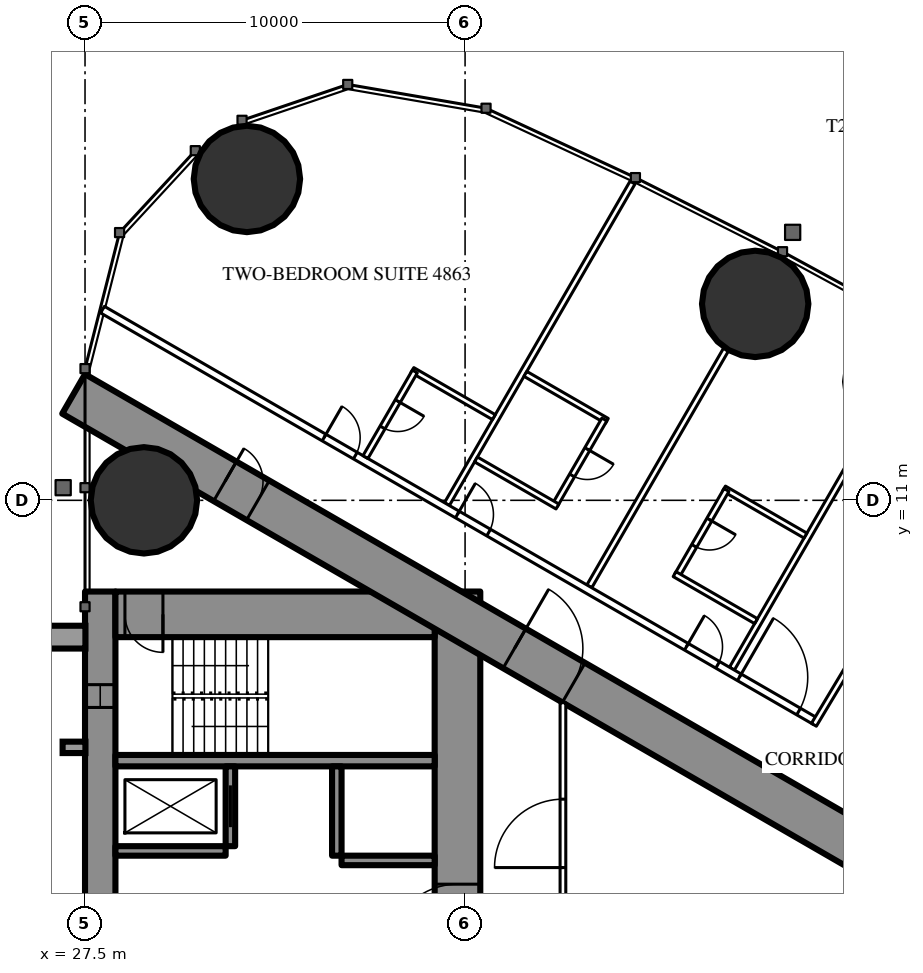
"""IFC4 building model, lengths in metres.
Left out: names, types, materials, properties, quantities, classifications, styles, units other than length and angle.
Written with IfcOpenShell. Run it as: python <this file> out.ifc"""

import sys

from ifc_helpers import new_model, si_unit, direction, frame, frame_2d, origin, origin_2d, place, context, subcontext, project, spatial, rectangle, circle, extrude, element, fill, save


model = new_model("IFC4")
c1 = context("Model", 3, precision=1e-05, world=origin(), true_north=direction((0.0, 1.0)))
c2 = subcontext(c1, "Body", "Model", "MODEL_VIEW")
j1 = project(units=[si_unit("LENGTHUNIT", "METRE"), si_unit("PLANEANGLEUNIT", "RADIAN")], contexts=[c1])
p1 = place(None, origin())
s1 = spatial("IfcSite", under=j1, at=p1, CompositionType="ELEMENT")
p2 = place(p1, origin())
s2 = spatial("IfcBuilding", under=s1, at=p2, CompositionType="ELEMENT")
p3 = place(p2, frame((0.0, 0.0, 180.8)))
s3 = spatial("IfcBuildingStorey", under=s2, at=p3, CompositionType="ELEMENT", Elevation=180.8)
for number, where, z_axis, x_axis in (
    (1, (31.76, 19.456, 0.0), (0.0, 0.0, 1.0), (1.0, 0.0, 0.0)),
    (2, (29.05, 11.0, 0.0), (0.0, 0.0, 1.0), (1.0, 0.0, 0.0)),
    (3, (45.134, 16.168, 0.0), (0.0, 0.0, 1.0), (1.0, 0.0, 0.0)),
):
    element("IfcColumn", number, at=place(p3, frame(where, z_axis=z_axis, x_axis=x_axis)), inside=s3, PredefinedType="COLUMN", context=c2, shape_type="SweptSolid", body=[
        extrude(circle(Radius=1.4, at=origin_2d()), origin(), (0.0, 0.0, 1.0), 3.5),
    ])
p4 = place(p3, frame((27.9, -8.6, 0.0), z_axis=(0.0, 0.0, 1.0), x_axis=(0.0, 1.0, 0.0)))
e4 = element("IfcWall", 4, at=p4, inside=s3, PredefinedType="SHEAR", context=c2, shape_type="SweptSolid", body=[
    extrude(rectangle(XDim=17.2, YDim=0.8, at=frame_2d((8.6, 0.0))), origin(), (0.0, 0.0, 1.0), 3.5),
])
p5 = place(p4, frame((2.45, 0.0, 0.6)))
e5 = element("IfcOpeningElement", 5, at=p5, cuts=e4, PredefinedType="OPENING", context=c2, shape_type="SweptSolid", body=[
    extrude(rectangle(XDim=0.6, YDim=2.1, at=frame_2d((0.3, 1.05))), frame((0.0, 0.41, 0.0), z_axis=(0.0, -1.0, 0.0), x_axis=(1.0, 0.0, 0.0)), (0.0, 0.0, 1.0), 0.82),
])
p6 = place(p4, frame((14.15, 0.0, 0.6)))
e6 = element("IfcOpeningElement", 6, at=p6, cuts=e4, PredefinedType="OPENING", context=c2, shape_type="SweptSolid", body=[
    extrude(rectangle(XDim=0.6, YDim=2.1, at=frame_2d((0.3, 1.05))), frame((0.0, 0.41, 0.0), z_axis=(0.0, -1.0, 0.0), x_axis=(1.0, 0.0, 0.0)), (0.0, 0.0, 1.0), 0.82),
])
p7 = place(p3, frame((37.3, -8.6, 0.0), z_axis=(0.0, 0.0, 1.0), x_axis=(0.0, 1.0, 0.0)))
e7 = element("IfcWall", 7, at=p7, inside=s3, PredefinedType="SHEAR", context=c2, shape_type="SweptSolid", body=[
    extrude(rectangle(XDim=17.2, YDim=1.2, at=frame_2d((8.6, 0.0))), origin(), (0.0, 0.0, 1.0), 3.5),
])
p8 = place(p7, frame((7.7, 0.0, 0.0)))
e8 = element("IfcOpeningElement", 8, at=p8, cuts=e7, PredefinedType="OPENING", context=c2, shape_type="SweptSolid", body=[
    extrude(rectangle(XDim=1.8, YDim=2.2, at=frame_2d((0.9, 1.1))), frame((0.0, 0.61, 0.0), z_axis=(0.0, -1.0, 0.0), x_axis=(1.0, 0.0, 0.0)), (0.0, 0.0, 1.0), 1.22),
])
p9 = place(p3, frame((28.3, 8.0, 0.0), z_axis=(0.0, 0.0, 1.0), x_axis=(1.0, 0.0, 0.0)))
e9 = element("IfcWall", 9, at=p9, inside=s3, PredefinedType="SHEAR", context=c2, shape_type="SweptSolid", body=[
    extrude(rectangle(XDim=8.4, YDim=1.2, at=frame_2d((4.2, 0.0))), origin(), (0.0, 0.0, 1.0), 3.5),
])
p10 = place(p9, frame((0.25, 0.0, 0.0)))
e10 = element("IfcOpeningElement", 10, at=p10, cuts=e9, PredefinedType="OPENING", context=c2, shape_type="SweptSolid", body=[
    extrude(rectangle(XDim=1.0, YDim=2.2, at=frame_2d((0.5, 1.1))), frame((0.0, 0.61, 0.0), z_axis=(0.0, -1.0, 0.0), x_axis=(1.0, 0.0, 0.0)), (0.0, 0.0, 1.0), 1.22),
])
p11 = place(p3, frame((28.3, 4.15, 0.0), z_axis=(0.0, 0.0, 1.0), x_axis=(1.0, 0.0, 0.0)))
e11 = element("IfcWall", 11, at=p11, inside=s3, PredefinedType="SHEAR", context=c2, shape_type="SweptSolid", body=[
    extrude(rectangle(XDim=8.4, YDim=0.3, at=frame_2d((4.2, 0.0))), origin(), (0.0, 0.0, 1.0), 3.5),
])
p12 = place(p3, frame((31.325, 1.9, 0.0), z_axis=(0.0, 0.0, 1.0), x_axis=(0.0, 1.0, 0.0)))
e12 = element("IfcWall", 12, at=p12, inside=s3, PredefinedType="SHEAR", context=c2, shape_type="SweptSolid", body=[
    extrude(rectangle(XDim=2.1, YDim=0.25, at=frame_2d((1.05, 0.0))), origin(), (0.0, 0.0, 1.0), 3.5),
])
p13 = place(p12, frame((0.5, 0.0, 0.0)))
e13 = element("IfcOpeningElement", 13, at=p13, cuts=e12, PredefinedType="OPENING", context=c2, shape_type="SweptSolid", body=[
    extrude(rectangle(XDim=1.1, YDim=2.2, at=frame_2d((0.55, 1.1))), frame((0.0, 0.135, 0.0), z_axis=(0.0, -1.0, 0.0), x_axis=(1.0, 0.0, 0.0)), (0.0, 0.0, 1.0), 0.27),
])
p14 = place(p3, frame((34.125, 1.65, 0.0), z_axis=(0.0, 0.0, 1.0), x_axis=(0.0, 1.0, 0.0)))
e14 = element("IfcWall", 14, at=p14, inside=s3, PredefinedType="SHEAR", context=c2, shape_type="SweptSolid", body=[
    extrude(rectangle(XDim=2.35, YDim=0.25, at=frame_2d((1.175, 0.0))), origin(), (0.0, 0.0, 1.0), 3.5),
])
p15 = place(p3, frame((28.3, 1.775, 0.0), z_axis=(0.0, 0.0, 1.0), x_axis=(1.0, 0.0, 0.0)))
e15 = element("IfcWall", 15, at=p15, inside=s3, PredefinedType="SHEAR", context=c2, shape_type="SweptSolid", body=[
    extrude(rectangle(XDim=2.9, YDim=0.25, at=frame_2d((1.45, 0.0))), origin(), (0.0, 0.0, 1.0), 3.5),
])
p16 = place(p3, frame((34.25, 1.525, 0.0), z_axis=(0.0, 0.0, 1.0), x_axis=(1.0, 0.0, 0.0)))
e16 = element("IfcWall", 16, at=p16, inside=s3, PredefinedType="SHEAR", context=c2, shape_type="SweptSolid", body=[
    extrude(rectangle(XDim=2.45, YDim=0.25, at=frame_2d((1.225, 0.0))), origin(), (0.0, 0.0, 1.0), 3.5),
])
p17 = place(p3, frame((27.2, -13.8, 0.0), z_axis=(0.0, 0.0, 1.0), x_axis=(0.866027159892, 0.499996958321, 0.0)))
e17 = element("IfcWall", 17, at=p17, inside=s3, PredefinedType="SHEAR", context=c2, shape_type="SweptSolid", body=[
    extrude(rectangle(XDim=27.947, YDim=1.2, at=frame_2d((13.973, 0.0))), origin(), (0.0, 0.0, 1.0), 3.5),
])
p18 = place(p17, frame((4.6, 0.0, 0.0)))
e18 = element("IfcOpeningElement", 18, at=p18, cuts=e17, PredefinedType="OPENING", context=c2, shape_type="SweptSolid", body=[
    extrude(rectangle(XDim=1.0, YDim=2.2, at=frame_2d((0.5, 1.1))), frame((0.0, 0.61, 0.0), z_axis=(0.0, -1.0, 0.0), x_axis=(1.0, 0.0, 0.0)), (0.0, 0.0, 1.0), 1.22),
])
p19 = place(p17, frame((13.395, 0.0, 0.0)))
e19 = element("IfcOpeningElement", 19, at=p19, cuts=e17, PredefinedType="OPENING", context=c2, shape_type="SweptSolid", body=[
    extrude(rectangle(XDim=1.8, YDim=2.2, at=frame_2d((0.9, 1.1))), frame((0.0, 0.61, 0.0), z_axis=(0.0, -1.0, 0.0), x_axis=(1.0, 0.0, 0.0)), (0.0, 0.0, 1.0), 1.22),
])
p20 = place(p3, frame((27.2, 13.8, 0.0), z_axis=(0.0, 0.0, 1.0), x_axis=(0.866024515034, -0.500001539357, 0.0)))
e20 = element("IfcWall", 20, at=p20, inside=s3, PredefinedType="SHEAR", context=c2, shape_type="SweptSolid", body=[
    extrude(rectangle(XDim=26.907, YDim=1.2, at=frame_2d((13.454, 0.0))), origin(), (0.0, 0.0, 1.0), 3.5),
])
p21 = place(p20, frame((4.6, 0.0, 0.0)))
e21 = element("IfcOpeningElement", 21, at=p21, cuts=e20, PredefinedType="OPENING", context=c2, shape_type="SweptSolid", body=[
    extrude(rectangle(XDim=1.0, YDim=2.2, at=frame_2d((0.5, 1.1))), frame((0.0, 0.61, 0.0), z_axis=(0.0, -1.0, 0.0), x_axis=(1.0, 0.0, 0.0)), (0.0, 0.0, 1.0), 1.22),
])
p22 = place(p20, frame((13.395, 0.0, 0.0)))
e22 = element("IfcOpeningElement", 22, at=p22, cuts=e20, PredefinedType="OPENING", context=c2, shape_type="SweptSolid", body=[
    extrude(rectangle(XDim=1.8, YDim=2.2, at=frame_2d((0.9, 1.1))), frame((0.0, 0.61, 0.0), z_axis=(0.0, -1.0, 0.0), x_axis=(1.0, 0.0, 0.0)), (0.0, 0.0, 1.0), 1.22),
])
p23 = place(p3, frame((37.022, 10.9, 0.0), z_axis=(0.0, 0.0, 1.0), x_axis=(0.499998620953, 0.866026199976, 0.0)))
e23 = element("IfcWall", 23, at=p23, inside=s3, PredefinedType="PARTITIONING", context=c2, shape_type="SweptSolid", body=[
    extrude(rectangle(XDim=9.77, YDim=0.15, at=frame_2d((4.885, 0.0))), origin(), (0.0, 0.0, 1.0), 3.25),
])
p24 = place(p3, frame((40.769, 8.737, 0.0), z_axis=(0.0, 0.0, 1.0), x_axis=(0.500013115284, 0.866017831539, 0.0)))
e24 = element("IfcWall", 24, at=p24, inside=s3, PredefinedType="PARTITIONING", context=c2, shape_type="SweptSolid", body=[
    extrude(rectangle(XDim=7.198, YDim=0.15, at=frame_2d((3.599, 0.0))), origin(), (0.0, 0.0, 1.0), 2.3),
])
p25 = place(p3, frame((44.521, 6.571, 0.0), z_axis=(0.0, 0.0, 1.0), x_axis=(0.500020376429, 0.866013639128, 0.0)))
e25 = element("IfcWall", 25, at=p25, inside=s3, PredefinedType="PARTITIONING", context=c2, shape_type="SweptSolid", body=[
    extrude(rectangle(XDim=7.306, YDim=0.15, at=frame_2d((3.653, 0.0))), origin(), (0.0, 0.0, 1.0), 2.3),
])
p26 = place(p3, frame((27.959, 16.017, 0.0), z_axis=(0.0, 0.0, 1.0), x_axis=(0.866027146794, -0.499996981007, 0.0)))
e26 = element("IfcWall", 26, at=p26, inside=s3, PredefinedType="PARTITIONING", context=c2, shape_type="SweptSolid", body=[
    extrude(rectangle(XDim=21.657, YDim=0.2, at=frame_2d((10.829, 0.0))), origin(), (0.0, 0.0, 1.0), 3.25),
])
p27 = place(p26, frame((17.741, 0.0, 0.0)))
e27 = element("IfcOpeningElement", 27, at=p27, cuts=e26, PredefinedType="OPENING", context=c2, shape_type="SweptSolid", body=[
    extrude(rectangle(XDim=0.95, YDim=2.2, at=frame_2d((0.475, 1.1))), frame((0.0, 0.11, 0.0), z_axis=(0.0, -1.0, 0.0), x_axis=(1.0, 0.0, 0.0)), (0.0, 0.0, 1.0), 0.22),
])
p28 = place(p26, frame((10.782, 0.0, 0.0)))
e28 = element("IfcOpeningElement", 28, at=p28, cuts=e26, PredefinedType="OPENING", context=c2, shape_type="SweptSolid", body=[
    extrude(rectangle(XDim=0.95, YDim=2.2, at=frame_2d((0.475, 1.1))), frame((0.0, 0.11, 0.0), z_axis=(0.0, -1.0, 0.0), x_axis=(1.0, 0.0, 0.0)), (0.0, 0.0, 1.0), 0.22),
])
p29 = place(p26, frame((6.732, 0.0, 0.0)))
e29 = element("IfcOpeningElement", 29, at=p29, cuts=e26, PredefinedType="OPENING", context=c2, shape_type="SweptSolid", body=[
    extrude(rectangle(XDim=0.95, YDim=2.2, at=frame_2d((0.475, 1.1))), frame((0.0, 0.11, 0.0), z_axis=(0.0, -1.0, 0.0), x_axis=(1.0, 0.0, 0.0)), (0.0, 0.0, 1.0), 0.22),
])
p30 = place(p26, frame((19.349, 0.0, 0.0)))
e30 = element("IfcOpeningElement", 30, at=p30, cuts=e26, PredefinedType="OPENING", context=c2, shape_type="SweptSolid", body=[
    extrude(rectangle(XDim=1.8, YDim=2.2, at=frame_2d((0.9, 1.1))), frame((0.0, 0.11, 0.0), z_axis=(0.0, -1.0, 0.0), x_axis=(1.0, 0.0, 0.0)), (0.0, 0.0, 1.0), 0.22),
])
p31 = place(p3, frame((47.606, 6.643, 0.0), z_axis=(0.0, 0.0, 1.0), x_axis=(-0.514237157483, -0.857648031458, 0.0)))
e31 = element("IfcWall", 31, at=p31, inside=s3, PredefinedType="PARTITIONING", context=c2, shape_type="SweptSolid", body=[
    extrude(rectangle(XDim=1.805, YDim=0.15, at=frame_2d((0.902, 0.0))), origin(), (0.0, 0.0, 1.0), 3.25),
])
p32 = place(p3, frame((44.313, 11.31, 0.0), z_axis=(0.0, 0.0, 1.0), x_axis=(0.866031185235, -0.4999899861, 0.0)))
e32 = element("IfcWall", 32, at=p32, inside=s3, PredefinedType="PARTITIONING", context=c2, shape_type="SweptSolid", body=[
    extrude(rectangle(XDim=2.475, YDim=0.15, at=frame_2d((1.238, 0.0))), origin(), (0.0, 0.0, 1.0), 3.25),
])
p33 = place(p3, frame((43.078, 9.021, 0.0), z_axis=(0.0, 0.0, 1.0), x_axis=(0.49997716683, 0.86603858612, 0.0)))
e33 = element("IfcWall", 33, at=p33, inside=s3, PredefinedType="PARTITIONING", context=c2, shape_type="SweptSolid", body=[
    extrude(rectangle(XDim=2.6, YDim=0.15, at=frame_2d((1.3, 0.0))), origin(), (0.0, 0.0, 1.0), 3.25),
])
p34 = place(p33, frame((0.9, 0.0, 0.0)))
e34 = element("IfcOpeningElement", 34, at=p34, cuts=e33, PredefinedType="OPENING", context=c2, shape_type="SweptSolid", body=[
    extrude(rectangle(XDim=0.8, YDim=2.2, at=frame_2d((0.4, 1.1))), frame((0.0, 0.085, 0.0), z_axis=(0.0, -1.0, 0.0), x_axis=(1.0, 0.0, 0.0)), (0.0, 0.0, 1.0), 0.17),
])
p35 = place(p3, frame((43.013, 9.058, 0.0), z_axis=(0.0, 0.0, 1.0), x_axis=(0.866006523861, -0.500032699561, 0.0)))
e35 = element("IfcWall", 35, at=p35, inside=s3, PredefinedType="PARTITIONING", context=c2, shape_type="SweptSolid", body=[
    extrude(rectangle(XDim=2.475, YDim=0.15, at=frame_2d((1.237, 0.0))), origin(), (0.0, 0.0, 1.0), 2.45),
])
p36 = place(p3, frame((39.087, 14.327, 0.0), z_axis=(0.0, 0.0, 1.0), x_axis=(0.866006523861, -0.500032699561, 0.0)))
e36 = element("IfcWall", 36, at=p36, inside=s3, PredefinedType="PARTITIONING", context=c2, shape_type="SweptSolid", body=[
    extrude(rectangle(XDim=2.475, YDim=0.15, at=frame_2d((1.237, 0.0))), origin(), (0.0, 0.0, 1.0), 3.25),
])
p37 = place(p3, frame((39.865, 10.875, 0.0), z_axis=(0.0, 0.0, 1.0), x_axis=(0.500047596559, 0.865997922154, 0.0)))
e37 = element("IfcWall", 37, at=p37, inside=s3, PredefinedType="PARTITIONING", context=c2, shape_type="SweptSolid", body=[
    extrude(rectangle(XDim=2.6, YDim=0.15, at=frame_2d((1.3, 0.0))), origin(), (0.0, 0.0, 1.0), 3.25),
])
p38 = place(p37, frame((0.9, 0.0, 0.0)))
e38 = element("IfcOpeningElement", 38, at=p38, cuts=e37, PredefinedType="OPENING", context=c2, shape_type="SweptSolid", body=[
    extrude(rectangle(XDim=0.8, YDim=2.2, at=frame_2d((0.4, 1.1))), frame((0.0, 0.085, 0.0), z_axis=(0.0, -1.0, 0.0), x_axis=(1.0, 0.0, 0.0)), (0.0, 0.0, 1.0), 0.17),
])
for number, where, z_axis, x_axis in (
    (39, (37.787, 12.075, 0.0), (0.0, 0.0, 1.0), (0.866, -0.5, 0.0)),
    (40, (36.114, 14.427, 0.0), (0.0, 0.0, 1.0), (0.866, -0.5, 0.0)),
):
    element("IfcWall", number, at=place(p3, frame(where, z_axis=z_axis, x_axis=x_axis)), inside=s3, PredefinedType="PARTITIONING", context=c2, shape_type="SweptSolid", body=[
        extrude(rectangle(XDim=2.475, YDim=0.15, at=frame_2d((1.237, 0.0))), origin(), (0.0, 0.0, 1.0), 3.25),
    ])
p39 = place(p3, frame((34.879, 12.138, 0.0), z_axis=(0.0, 0.0, 1.0), x_axis=(0.500006934395, 0.866021400173, 0.0)))
e41 = element("IfcWall", 41, at=p39, inside=s3, PredefinedType="PARTITIONING", context=c2, shape_type="SweptSolid", body=[
    extrude(rectangle(XDim=2.6, YDim=0.15, at=frame_2d((1.3, 0.0))), origin(), (0.0, 0.0, 1.0), 3.25),
])
p40 = place(p39, frame((0.9, 0.0, 0.0)))
e42 = element("IfcOpeningElement", 42, at=p40, cuts=e41, PredefinedType="OPENING", context=c2, shape_type="SweptSolid", body=[
    extrude(rectangle(XDim=0.8, YDim=2.2, at=frame_2d((0.4, 1.1))), frame((0.0, 0.085, 0.0), z_axis=(0.0, -1.0, 0.0), x_axis=(1.0, 0.0, 0.0)), (0.0, 0.0, 1.0), 0.17),
])
p41 = place(p3, frame((40.075, -1.2, 0.0), z_axis=(0.0, 0.0, 1.0), x_axis=(0.0, 1.0, 0.0)))
e43 = element("IfcWall", 43, at=p41, inside=s3, PredefinedType="PARTITIONING", context=c2, shape_type="SweptSolid", body=[
    extrude(rectangle(XDim=6.874, YDim=0.15, at=frame_2d((3.437, 0.0))), origin(), (0.0, 0.0, 1.0), 3.25),
])
p42 = place(p41, frame((2.537, 0.0, 0.0)))
e44 = element("IfcOpeningElement", 44, at=p42, cuts=e43, PredefinedType="OPENING", context=c2, shape_type="SweptSolid", body=[
    extrude(rectangle(XDim=1.8, YDim=2.2, at=frame_2d((0.9, 1.1))), frame((0.0, 0.085, 0.0), z_axis=(0.0, -1.0, 0.0), x_axis=(1.0, 0.0, 0.0)), (0.0, 0.0, 1.0), 0.17),
])
p43 = place(p34, origin())
e45 = element("IfcDoor", 45, at=p43, inside=s3, OperationType="SINGLE_SWING_RIGHT", PredefinedType="DOOR", context=c2, shape_type="SweptSolid", body=[
    extrude(rectangle(XDim=0.8, YDim=2.2, at=frame_2d((0.4, 1.1))), frame((0.0, 0.025, 0.0), z_axis=(0.0, -1.0, 0.0), x_axis=(1.0, 0.0, 0.0)), (0.0, 0.0, 1.0), 0.05),
])
fill(e34, e45)
p44 = place(p27, origin())
e46 = element("IfcDoor", 46, at=p44, inside=s3, OperationType="SINGLE_SWING_LEFT", PredefinedType="DOOR", context=c2, shape_type="SweptSolid", body=[
    extrude(rectangle(XDim=0.95, YDim=2.2, at=frame_2d((0.475, 1.1))), frame((0.0, 0.025, 0.0), z_axis=(0.0, -1.0, 0.0), x_axis=(1.0, 0.0, 0.0)), (0.0, 0.0, 1.0), 0.05),
])
fill(e27, e46)
p45 = place(p38, origin())
e47 = element("IfcDoor", 47, at=p45, inside=s3, OperationType="SINGLE_SWING_RIGHT", PredefinedType="DOOR", context=c2, shape_type="SweptSolid", body=[
    extrude(rectangle(XDim=0.8, YDim=2.2, at=frame_2d((0.4, 1.1))), frame((0.0, 0.025, 0.0), z_axis=(0.0, -1.0, 0.0), x_axis=(1.0, 0.0, 0.0)), (0.0, 0.0, 1.0), 0.05),
])
fill(e38, e47)
p46 = place(p28, origin())
e48 = element("IfcDoor", 48, at=p46, inside=s3, OperationType="SINGLE_SWING_LEFT", PredefinedType="DOOR", context=c2, shape_type="SweptSolid", body=[
    extrude(rectangle(XDim=0.95, YDim=2.2, at=frame_2d((0.475, 1.1))), frame((0.0, 0.025, 0.0), z_axis=(0.0, -1.0, 0.0), x_axis=(1.0, 0.0, 0.0)), (0.0, 0.0, 1.0), 0.05),
])
fill(e28, e48)
p47 = place(p40, origin())
e49 = element("IfcDoor", 49, at=p47, inside=s3, OperationType="SINGLE_SWING_RIGHT", PredefinedType="DOOR", context=c2, shape_type="SweptSolid", body=[
    extrude(rectangle(XDim=0.8, YDim=2.2, at=frame_2d((0.4, 1.1))), frame((0.0, 0.025, 0.0), z_axis=(0.0, -1.0, 0.0), x_axis=(1.0, 0.0, 0.0)), (0.0, 0.0, 1.0), 0.05),
])
fill(e42, e49)
p48 = place(p29, origin())
e50 = element("IfcDoor", 50, at=p48, inside=s3, OperationType="SINGLE_SWING_LEFT", PredefinedType="DOOR", context=c2, shape_type="SweptSolid", body=[
    extrude(rectangle(XDim=0.95, YDim=2.2, at=frame_2d((0.475, 1.1))), frame((0.0, 0.025, 0.0), z_axis=(0.0, -1.0, 0.0), x_axis=(1.0, 0.0, 0.0)), (0.0, 0.0, 1.0), 0.05),
])
fill(e29, e50)
p49 = place(p30, origin())
e51 = element("IfcDoor", 51, at=p49, inside=s3, OperationType="DOUBLE_DOOR_SINGLE_SWING", PredefinedType="DOOR", context=c2, shape_type="SweptSolid", body=[
    extrude(rectangle(XDim=1.8, YDim=2.2, at=frame_2d((0.9, 1.1))), frame((0.0, 0.025, 0.0), z_axis=(0.0, -1.0, 0.0), x_axis=(1.0, 0.0, 0.0)), (0.0, 0.0, 1.0), 0.05),
])
fill(e30, e51)
p50 = place(p42, origin())
e52 = element("IfcDoor", 52, at=p50, inside=s3, OperationType="DOUBLE_DOOR_SINGLE_SWING", PredefinedType="DOOR", context=c2, shape_type="SweptSolid", body=[
    extrude(rectangle(XDim=1.8, YDim=2.2, at=frame_2d((0.9, 1.1))), frame((0.0, 0.025, 0.0), z_axis=(0.0, -1.0, 0.0), x_axis=(1.0, 0.0, 0.0)), (0.0, 0.0, 1.0), 0.05),
])
fill(e44, e52)
p51 = place(p21, origin())
e53 = element("IfcDoor", 53, at=p51, inside=s3, OperationType="SINGLE_SWING_LEFT", PredefinedType="DOOR", context=c2, shape_type="SweptSolid", body=[
    extrude(rectangle(XDim=1.0, YDim=2.2, at=frame_2d((0.5, 1.1))), frame((0.0, 0.025, 0.0), z_axis=(0.0, -1.0, 0.0), x_axis=(1.0, 0.0, 0.0)), (0.0, 0.0, 1.0), 0.05),
])
fill(e21, e53)
p52 = place(p22, origin())
e54 = element("IfcDoor", 54, at=p52, inside=s3, OperationType="DOUBLE_DOOR_SINGLE_SWING", PredefinedType="DOOR", context=c2, shape_type="SweptSolid", body=[
    extrude(rectangle(XDim=1.8, YDim=2.2, at=frame_2d((0.9, 1.1))), frame((0.0, 0.025, 0.0), z_axis=(0.0, -1.0, 0.0), x_axis=(1.0, 0.0, 0.0)), (0.0, 0.0, 1.0), 0.05),
])
fill(e22, e54)
p53 = place(p8, origin())
e55 = element("IfcDoor", 55, at=p53, inside=s3, OperationType="DOUBLE_DOOR_SINGLE_SWING", PredefinedType="DOOR", context=c2, shape_type="SweptSolid", body=[
    extrude(rectangle(XDim=1.8, YDim=2.2, at=frame_2d((0.9, 1.1))), frame((0.0, 0.025, 0.0), z_axis=(0.0, -1.0, 0.0), x_axis=(1.0, 0.0, 0.0)), (0.0, 0.0, 1.0), 0.05),
])
fill(e8, e55)
p54 = place(p10, origin())
e56 = element("IfcDoor", 56, at=p54, inside=s3, OperationType="SINGLE_SWING_RIGHT", PredefinedType="DOOR", context=c2, shape_type="SweptSolid", body=[
    extrude(rectangle(XDim=1.0, YDim=2.2, at=frame_2d((0.5, 1.1))), frame((0.0, 0.025, 0.0), z_axis=(0.0, -1.0, 0.0), x_axis=(1.0, 0.0, 0.0)), (0.0, 0.0, 1.0), 0.05),
])
fill(e10, e56)
p55 = place(p13, origin())
e57 = element("IfcDoor", 57, at=p55, inside=s3, OperationType="SLIDING_TO_LEFT", PredefinedType="USERDEFINED", context=c2, shape_type="SweptSolid", body=[
    extrude(rectangle(XDim=1.1, YDim=2.2, at=frame_2d((0.55, 1.1))), frame((0.0, 0.025, 0.0), z_axis=(0.0, -1.0, 0.0), x_axis=(1.0, 0.0, 0.0)), (0.0, 0.0, 1.0), 0.05),
])
fill(e13, e57)
p56 = place(p6, origin())
e58 = element("IfcWindow", 58, at=p56, inside=s3, PartitioningType="SINGLE_PANEL", PredefinedType="WINDOW", context=c2, shape_type="SweptSolid", body=[
    extrude(rectangle(XDim=0.6, YDim=2.1, at=frame_2d((0.3, 1.05))), frame((0.0, 0.03, 0.0), z_axis=(0.0, -1.0, 0.0), x_axis=(1.0, 0.0, 0.0)), (0.0, 0.0, 1.0), 0.06),
])
fill(e6, e58)
save(model, sys.argv[1])
